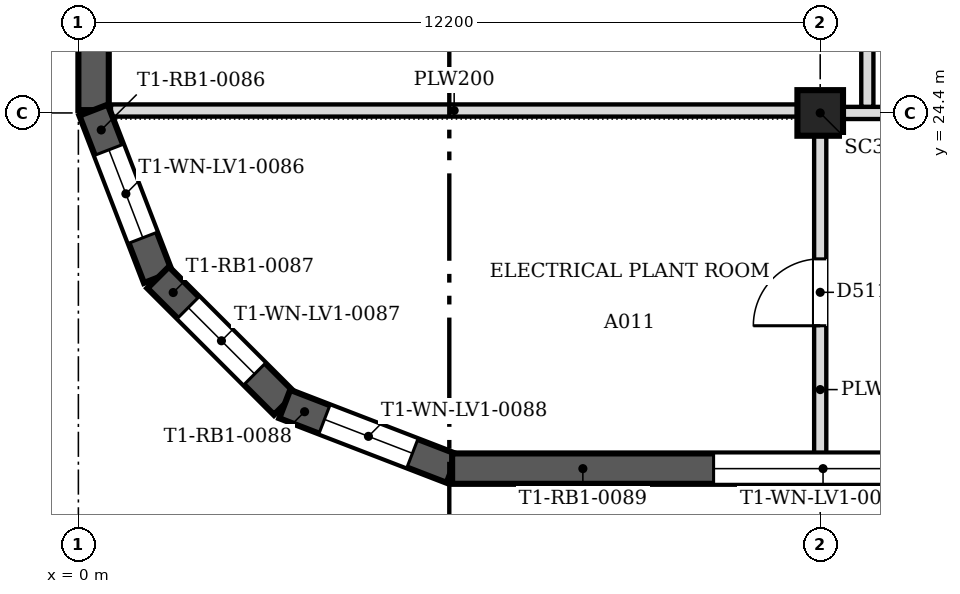
"""IFC4 building model, lengths in metres.
Left out: names, types, materials, properties, quantities, classifications, styles, units other than length and angle.
Written with IfcOpenShell. Run it as: python <this file> out.ifc"""

import sys

from ifc_helpers import new_model, si_unit, direction, frame, frame_2d, origin, origin_2d, place, context, subcontext, project, spatial, polyline, rectangle, outline, extrude, faceted_brep, source, transform, mapped, element, fill, save


model = new_model("IFC4")
c1 = context("Model", 3, precision=1e-05, world=origin(), true_north=direction((0.0, 1.0)))
c2 = subcontext(c1, "Body", "Model", "MODEL_VIEW")
j1 = project(units=[si_unit("LENGTHUNIT", "METRE"), si_unit("PLANEANGLEUNIT", "RADIAN")], contexts=[c1])
p1 = place(None, origin())
s1 = spatial("IfcSite", under=j1, at=p1, CompositionType="ELEMENT")
p2 = place(p1, origin())
s2 = spatial("IfcBuilding", under=s1, at=p2, CompositionType="ELEMENT")
p3 = place(p2, frame((0.0, 0.0, 232.1)))
s3 = spatial("IfcBuildingStorey", under=s2, at=p3, CompositionType="ELEMENT", Elevation=232.1)
p4 = place(p3, frame((12.2, 24.4, 0.0), z_axis=(0.0, 0.0, 1.0), x_axis=(1.0, 0.0, 0.0)))
e1 = element("IfcColumn", 1, at=p4, inside=s3, PredefinedType="COLUMN", context=c2, shape_type="SweptSolid", body=[
    extrude(rectangle(XDim=0.75, YDim=0.75, at=origin_2d()), origin(), (0.0, 0.0, 1.0), 4.6),
])
m1 = source(origin(), c2, "Body", "Brep", [
    faceted_brep([(0.0, -0.25, 0.0), (12.154, -0.25, 0.0), (12.154, -0.25, 4.8), (0.0, -0.25, 4.8), (0.0, 0.25, 4.8), (12.107, 0.25, 4.8), (12.107, 0.25, 0.0), (0.0, 0.25, 0.0), (12.154, -0.0, 0.0), (12.154, -0.0, 4.8)], [[[0, 1, 2, 3]], [[4, 5, 6, 7]], [[7, 6, 8, 1, 0]], [[9, 2, 1, 8]], [[5, 4, 3, 2, 9]], [[4, 7, 0, 3]], [[8, 6, 5, 9]]]),
])
p5 = place(p3, frame((0.25, 36.6, 0.0), z_axis=(0.0, 0.0, 1.0), x_axis=(0.0, -1.0, 0.0)))
e2 = element("IfcWall", 2, at=p5, inside=s3, PredefinedType="SOLIDWALL", context=c2, shape_type="MappedRepresentation", body=[
    mapped(m1, transform((0.0, 0.0, 0.0), scale=1.0)),
])
m2 = source(origin(), c2, "Body", "SweptSolid", [
    extrude(outline(polyline([(4.277, 0.8), (7.877, 0.8), (7.877, 4.0), (4.277, 4.0), (4.277, 0.8)])), frame((0.0, 0.26, 0.0), z_axis=(0.0, -1.0, 0.0), x_axis=(1.0, 0.0, 0.0)), (0.0, 0.0, 1.0), 0.52),
])
p6 = place(p5, origin())
e3 = element("IfcOpeningElement", 3, at=p6, cuts=e2, PredefinedType="OPENING", context=c2, shape_type="MappedRepresentation", body=[
    mapped(m2, transform((0.0, 0.0, 0.0), scale=1.0)),
])
m3 = source(origin(), c2, "Body", "Brep", [
    faceted_brep([(0.0, -0.25, 0.0), (2.95, -0.25, 0.0), (2.95, -0.25, 4.8), (0.0, -0.25, 4.8), (0.047, 0.25, 4.8), (2.898, 0.25, 4.8), (2.898, 0.25, 0.0), (0.047, 0.25, 0.0), (2.95, 0.0, 0.0), (0.0, 0.0, 0.0), (2.95, 0.0, 4.8), (0.0, 0.0, 4.8)], [[[0, 1, 2, 3]], [[4, 5, 6, 7]], [[7, 6, 8, 1, 0, 9]], [[10, 2, 1, 8]], [[5, 4, 11, 3, 2, 10]], [[9, 0, 3, 11]], [[7, 9, 11, 4]], [[8, 6, 5, 10]]]),
])
p7 = place(p3, frame((0.25, 24.447, 0.0), z_axis=(0.0, 0.0, 1.0), x_axis=(0.359877213415, -0.932999673775, 0.0)))
e4 = element("IfcWall", 4, at=p7, inside=s3, PredefinedType="SOLIDWALL", context=c2, shape_type="MappedRepresentation", body=[
    mapped(m3, transform((0.0, 0.0, 0.0), scale=1.0)),
])
m4 = source(origin(), c2, "Body", "SweptSolid", [
    extrude(outline(polyline([(0.7, 0.8), (2.25, 0.8), (2.25, 4.0), (0.7, 4.0), (0.7, 0.8)])), frame((0.0, 0.26, 0.0), z_axis=(0.0, -1.0, 0.0), x_axis=(1.0, 0.0, 0.0)), (0.0, 0.0, 1.0), 0.52),
])
p8 = place(p7, origin())
e5 = element("IfcOpeningElement", 5, at=p8, cuts=e4, PredefinedType="OPENING", context=c2, shape_type="MappedRepresentation", body=[
    mapped(m4, transform((0.0, 0.0, 0.0), scale=1.0)),
])
m5 = source(origin(), c2, "Body", "Brep", [
    faceted_brep([(0.0, -0.25, 0.0), (2.944, -0.25, 0.0), (2.944, -0.25, 4.8), (0.0, -0.25, 4.8), (0.053, 0.25, 4.8), (2.891, 0.25, 4.8), (2.891, 0.25, 0.0), (0.053, 0.25, 0.0), (2.944, 0.0, 0.0), (0.0, 0.0, 0.0), (2.944, 0.0, 4.8), (0.0, 0.0, 4.8)], [[[0, 1, 2, 3]], [[4, 5, 6, 7]], [[7, 6, 8, 1, 0, 9]], [[10, 2, 1, 8]], [[5, 4, 11, 3, 2, 10]], [[9, 0, 3, 11]], [[7, 9, 11, 4]], [[8, 6, 5, 10]]]),
])
p9 = place(p3, frame((1.312, 21.694, 0.0), z_axis=(0.0, 0.0, 1.0), x_axis=(0.707106781187, -0.707106781187, 0.0)))
e6 = element("IfcWall", 6, at=p9, inside=s3, PredefinedType="SOLIDWALL", context=c2, shape_type="MappedRepresentation", body=[
    mapped(m5, transform((0.0, 0.0, 0.0), scale=1.0)),
])
m6 = source(origin(), c2, "Body", "SweptSolid", [
    extrude(outline(polyline([(0.7, 0.8), (2.244, 0.8), (2.244, 4.0), (0.7, 4.0), (0.7, 0.8)])), frame((0.0, 0.26, 0.0), z_axis=(0.0, -1.0, 0.0), x_axis=(1.0, 0.0, 0.0)), (0.0, 0.0, 1.0), 0.52),
])
p10 = place(p9, origin())
e7 = element("IfcOpeningElement", 7, at=p10, cuts=e6, PredefinedType="OPENING", context=c2, shape_type="MappedRepresentation", body=[
    mapped(m6, transform((0.0, 0.0, 0.0), scale=1.0)),
])
m7 = source(origin(), c2, "Body", "Brep", [
    faceted_brep([(0.0, -0.25, 0.0), (2.95, -0.25, 0.0), (2.95, -0.25, 4.8), (0.0, -0.25, 4.8), (0.053, 0.25, 4.8), (2.904, 0.25, 4.8), (2.904, 0.25, 0.0), (0.053, 0.25, 0.0), (2.95, 0.0, 0.0), (0.0, 0.0, 0.0), (2.95, 0.0, 4.8), (0.0, 0.0, 4.8)], [[[0, 1, 2, 3]], [[4, 5, 6, 7]], [[7, 6, 8, 1, 0, 9]], [[10, 2, 1, 8]], [[5, 4, 11, 3, 2, 10]], [[9, 0, 3, 11]], [[7, 9, 11, 4]], [[8, 6, 5, 10]]]),
])
p11 = place(p3, frame((3.394, 19.612, 0.0), z_axis=(0.0, 0.0, 1.0), x_axis=(0.932999673775, -0.359877213415, 0.0)))
e8 = element("IfcWall", 8, at=p11, inside=s3, PredefinedType="SOLIDWALL", context=c2, shape_type="MappedRepresentation", body=[
    mapped(m7, transform((0.0, 0.0, 0.0), scale=1.0)),
])
p12 = place(p11, origin())
e9 = element("IfcOpeningElement", 9, at=p12, cuts=e8, PredefinedType="OPENING", context=c2, shape_type="MappedRepresentation", body=[
    mapped(m4, transform((0.0, 0.0, 0.0), scale=1.0)),
])
m8 = source(origin(), c2, "Body", "Brep", [
    faceted_brep([(0.0, -0.25, 0.0), (12.154, -0.25, 0.0), (12.154, -0.25, 4.8), (0.0, -0.25, 4.8), (0.047, 0.25, 4.8), (12.2, 0.25, 4.8), (12.2, 0.25, 0.0), (0.047, 0.25, 0.0), (12.2, -0.0, 0.0), (0.0, 0.0, 0.0), (12.2, -0.0, 4.8), (0.0, 0.0, 4.8)], [[[0, 1, 2, 3]], [[4, 5, 6, 7]], [[7, 6, 8, 1, 0, 9]], [[6, 5, 10, 8]], [[5, 4, 11, 3, 2, 10]], [[9, 0, 3, 11]], [[7, 9, 11, 4]], [[1, 8, 10, 2]]]),
])
p13 = place(p3, frame((6.146, 18.55, 0.0), z_axis=(0.0, 0.0, 1.0), x_axis=(1.0, 0.0, 0.0)))
e10 = element("IfcWall", 10, at=p13, inside=s3, PredefinedType="SOLIDWALL", context=c2, shape_type="MappedRepresentation", body=[
    mapped(m8, transform((0.0, 0.0, 0.0), scale=1.0)),
])
m9 = source(origin(), c2, "Body", "SweptSolid", [
    extrude(outline(polyline([(4.3, 0.8), (7.9, 0.8), (7.9, 4.0), (4.3, 4.0), (4.3, 0.8)])), frame((0.0, 0.26, 0.0), z_axis=(0.0, -1.0, 0.0), x_axis=(1.0, 0.0, 0.0)), (0.0, 0.0, 1.0), 0.52),
])
p14 = place(p13, origin())
e11 = element("IfcOpeningElement", 11, at=p14, cuts=e10, PredefinedType="OPENING", context=c2, shape_type="MappedRepresentation", body=[
    mapped(m9, transform((0.0, 0.0, 0.0), scale=1.0)),
])
p15 = place(p3, frame((12.2, 18.8, 0.0), z_axis=(0.0, 0.0, 1.0), x_axis=(0.0, 1.0, 0.0)))
e12 = element("IfcWall", 12, at=p15, inside=s3, PredefinedType="PARTITIONING", context=c2, shape_type="SweptSolid", body=[
    extrude(rectangle(XDim=5.224, YDim=0.2, at=frame_2d((2.612, 0.0))), origin(), (0.0, 0.0, 1.0), 3.817),
])
m10 = source(origin(), c2, "Body", "SweptSolid", [
    extrude(rectangle(XDim=1.1, YDim=2.1, at=frame_2d((0.55, 1.05))), frame((0.0, 0.11, 0.0), z_axis=(0.0, -1.0, 0.0), x_axis=(1.0, 0.0, 0.0)), (0.0, 0.0, 1.0), 0.22),
])
p16 = place(p15, frame((2.1, 0.0, 0.0)))
e13 = element("IfcOpeningElement", 13, at=p16, cuts=e12, PredefinedType="OPENING", context=c2, shape_type="MappedRepresentation", body=[
    mapped(m10, transform((0.0, 0.0, 0.0), scale=1.0)),
])
p17 = place(p3, frame((0.536, 24.44, 0.0), z_axis=(0.0, 0.0, 1.0), x_axis=(1.0, 0.0, 0.0)))
e14 = element("IfcWall", 14, at=p17, inside=s3, PredefinedType="PARTITIONING", context=c2, shape_type="SweptSolid", body=[
    extrude(rectangle(XDim=11.288, YDim=0.2, at=frame_2d((5.644, 0.0))), origin(), (0.0, 0.0, 1.0), 3.817),
])
p18 = place(p3, frame((12.576, 24.4, 0.0), z_axis=(0.0, 0.0, 1.0), x_axis=(1.0, 0.0, 0.0)))
e15 = element("IfcWall", 15, at=p18, inside=s3, PredefinedType="PARTITIONING", context=c2, shape_type="SweptSolid", body=[
    extrude(rectangle(XDim=11.448, YDim=0.2, at=frame_2d((5.724, 0.0))), origin(), (0.0, 0.0, 1.0), 3.817),
])
p19 = place(p3, frame((12.975, 24.501, 0.0), z_axis=(0.0, 0.0, 1.0), x_axis=(0.0, 1.0, 0.0)))
e16 = element("IfcWall", 16, at=p19, inside=s3, PredefinedType="PARTITIONING", context=c2, shape_type="SweptSolid", body=[
    extrude(rectangle(XDim=5.598, YDim=0.2, at=frame_2d((2.799, 0.0))), origin(), (0.0, 0.0, 1.0), 3.817),
])
p20 = place(p19, frame((2.2, 0.0, 0.0)))
e17 = element("IfcOpeningElement", 17, at=p20, cuts=e16, PredefinedType="OPENING", context=c2, shape_type="MappedRepresentation", body=[
    mapped(m10, transform((0.0, 0.0, 0.0), scale=1.0)),
])
m11 = source(origin(), c2, "Body", "SweptSolid", [
    extrude(outline(polyline([(0.7, 0.8), (2.25, 0.8), (2.25, 4.0), (0.7, 4.0), (0.7, 0.8)])), frame((0.0, 0.03, 0.0), z_axis=(0.0, -1.0, 0.0), x_axis=(1.0, 0.0, 0.0)), (0.0, 0.0, 1.0), 0.06),
])
p21 = place(p8, origin())
e18 = element("IfcWindow", 18, at=p21, inside=s3, PartitioningType="USERDEFINED", PredefinedType="WINDOW", context=c2, shape_type="MappedRepresentation", body=[
    mapped(m11, transform((0.0, 0.0, 0.0), scale=1.0)),
])
fill(e5, e18)
m12 = source(origin(), c2, "Body", "SweptSolid", [
    extrude(outline(polyline([(0.7, 0.8), (2.244, 0.8), (2.244, 4.0), (0.7, 4.0), (0.7, 0.8)])), frame((0.0, 0.03, 0.0), z_axis=(0.0, -1.0, 0.0), x_axis=(1.0, 0.0, 0.0)), (0.0, 0.0, 1.0), 0.06),
])
p22 = place(p10, origin())
e19 = element("IfcWindow", 19, at=p22, inside=s3, PartitioningType="USERDEFINED", PredefinedType="WINDOW", context=c2, shape_type="MappedRepresentation", body=[
    mapped(m12, transform((0.0, 0.0, 0.0), scale=1.0)),
])
fill(e7, e19)
p23 = place(p12, origin())
e20 = element("IfcWindow", 20, at=p23, inside=s3, PartitioningType="USERDEFINED", PredefinedType="WINDOW", context=c2, shape_type="MappedRepresentation", body=[
    mapped(m11, transform((0.0, 0.0, 0.0), scale=1.0)),
])
fill(e9, e20)
m13 = source(origin(), c2, "Body", "SweptSolid", [
    extrude(outline(polyline([(4.3, 0.8), (7.9, 0.8), (7.9, 4.0), (4.3, 4.0), (4.3, 0.8)])), frame((0.0, 0.03, 0.0), z_axis=(0.0, -1.0, 0.0), x_axis=(1.0, 0.0, 0.0)), (0.0, 0.0, 1.0), 0.06),
])
p24 = place(p14, origin())
e21 = element("IfcWindow", 21, at=p24, inside=s3, PartitioningType="USERDEFINED", PredefinedType="WINDOW", context=c2, shape_type="MappedRepresentation", body=[
    mapped(m13, transform((0.0, 0.0, 0.0), scale=1.0)),
])
fill(e11, e21)
m14 = source(origin(), c2, "Body", "SweptSolid", [
    extrude(rectangle(XDim=1.1, YDim=2.1, at=frame_2d((0.55, 1.05))), frame((0.0, 0.025, 0.0), z_axis=(0.0, -1.0, 0.0), x_axis=(1.0, 0.0, 0.0)), (0.0, 0.0, 1.0), 0.05),
])
p25 = place(p16, origin())
e22 = element("IfcDoor", 22, at=p25, inside=s3, OperationType="SINGLE_SWING_LEFT", PredefinedType="DOOR", context=c2, shape_type="MappedRepresentation", body=[
    mapped(m14, transform((0.0, 0.0, 0.0), scale=1.0)),
])
fill(e13, e22)
save(model, sys.argv[1])
